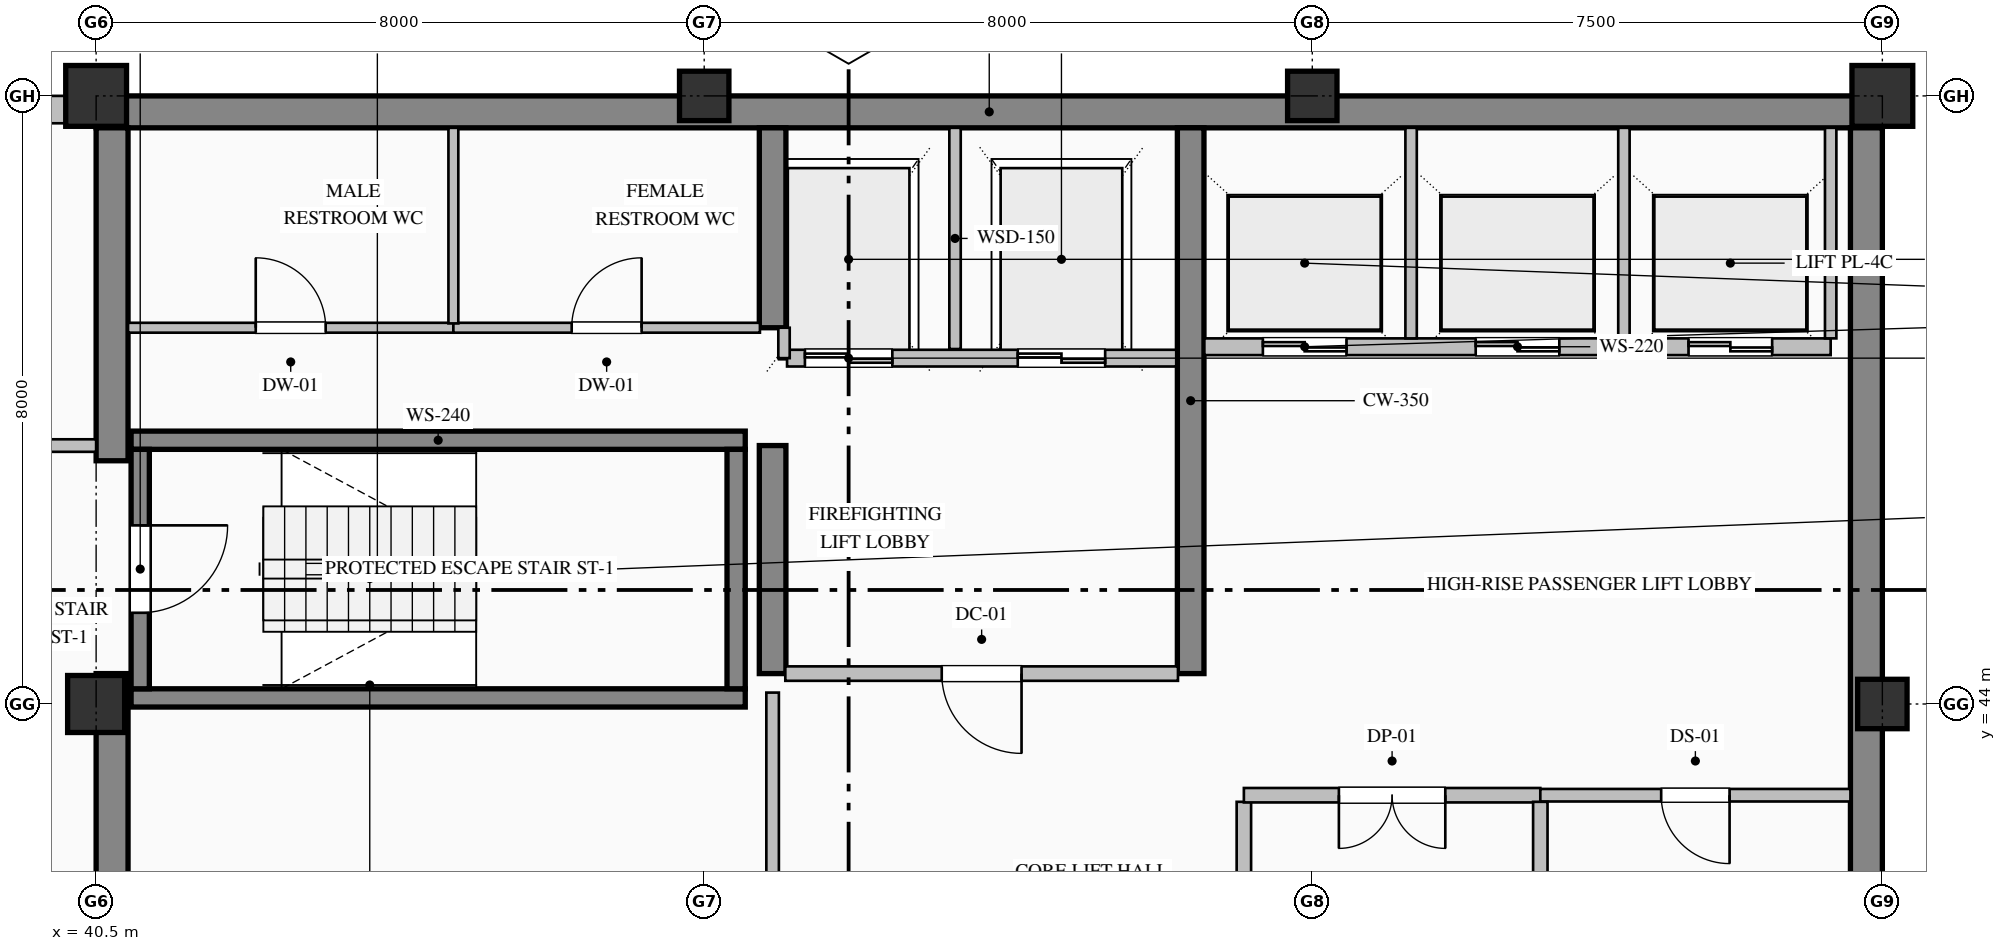
"""IFC4 building model, lengths in metres.
Left out: names, types, materials, properties, quantities, classifications, styles, units other than length and angle.
Written with IfcOpenShell. Run it as: python <this file> out.ifc"""

import sys

from ifc_helpers import new_model, si_unit, direction, frame, frame_2d, origin, origin_2d, place, context, subcontext, project, spatial, rectangle, hollow_rectangle, extrude, element, fill, save


model = new_model("IFC4")
c1 = context("Model", 3, precision=1e-05, world=origin(), true_north=direction((0.0, 1.0)))
c2 = subcontext(c1, "Body", "Model", "MODEL_VIEW")
j1 = project(units=[si_unit("LENGTHUNIT", "METRE"), si_unit("PLANEANGLEUNIT", "RADIAN")], contexts=[c1])
p1 = place(None, origin())
s1 = spatial("IfcSite", under=j1, at=p1, CompositionType="ELEMENT")
p2 = place(p1, origin())
s2 = spatial("IfcBuilding", under=s1, at=p2, CompositionType="ELEMENT")
p3 = place(p2, frame((0.0, 0.0, 315.2)))
s3 = spatial("IfcBuildingStorey", under=s2, at=p3, CompositionType="ELEMENT", Elevation=315.2)
p4 = place(p3, frame((40.5, 51.79, 0.0), z_axis=(0.0, 0.0, 1.0), x_axis=(1.0, 0.0, 0.0)))
e1 = element("IfcWall", 1, at=p4, inside=s3, PredefinedType="SHEAR", context=c2, shape_type="SweptSolid", body=[
    extrude(rectangle(XDim=23.5, YDim=0.42, at=frame_2d((11.75, 0.0))), origin(), (0.0, 0.0, 1.0), 3.785),
])
p5 = place(p3, frame((63.79, 36.32, 0.0), z_axis=(0.0, 0.0, 1.0), x_axis=(0.0, 1.0, 0.0)))
e2 = element("IfcWall", 2, at=p5, inside=s3, PredefinedType="SHEAR", context=c2, shape_type="SweptSolid", body=[
    extrude(rectangle(XDim=15.26, YDim=0.42, at=frame_2d((7.63, 0.0))), origin(), (0.0, 0.0, 1.0), 3.785),
])
p6 = place(p3, frame((40.71, 36.42, 0.0), z_axis=(0.0, 0.0, 1.0), x_axis=(0.0, 1.0, 0.0)))
e3 = element("IfcWall", 3, at=p6, inside=s3, PredefinedType="SHEAR", context=c2, shape_type="SweptSolid", body=[
    extrude(rectangle(XDim=7.98, YDim=0.42, at=frame_2d((3.99, 0.0))), origin(), (0.0, 0.0, 1.0), 3.785),
])
p7 = place(p3, frame((40.71, 47.2, 0.0), z_axis=(0.0, 0.0, 1.0), x_axis=(0.0, 1.0, 0.0)))
e4 = element("IfcWall", 4, at=p7, inside=s3, PredefinedType="SHEAR", context=c2, shape_type="SweptSolid", body=[
    extrude(rectangle(XDim=4.38, YDim=0.42, at=frame_2d((2.19, 0.0))), origin(), (0.0, 0.0, 1.0), 3.785),
])
p8 = place(p3, frame((49.4, 44.4, 0.0), z_axis=(0.0, 0.0, 1.0), x_axis=(0.0, 1.0, 0.0)))
e5 = element("IfcWall", 5, at=p8, inside=s3, PredefinedType="SHEAR", context=c2, shape_type="SweptSolid", body=[
    extrude(rectangle(XDim=3.0, YDim=0.35, at=frame_2d((1.5, 0.0))), origin(), (0.0, 0.0, 1.0), 3.785),
])
p9 = place(p3, frame((49.4, 48.95, 0.0), z_axis=(0.0, 0.0, 1.0), x_axis=(0.0, 1.0, 0.0)))
e6 = element("IfcWall", 6, at=p9, inside=s3, PredefinedType="SHEAR", context=c2, shape_type="SweptSolid", body=[
    extrude(rectangle(XDim=2.63, YDim=0.35, at=frame_2d((1.315, 0.0))), origin(), (0.0, 0.0, 1.0), 3.785),
])
p10 = place(p3, frame((54.9, 44.4, 0.0), z_axis=(0.0, 0.0, 1.0), x_axis=(0.0, 1.0, 0.0)))
e7 = element("IfcWall", 7, at=p10, inside=s3, PredefinedType="SHEAR", context=c2, shape_type="SweptSolid", body=[
    extrude(rectangle(XDim=7.18, YDim=0.35, at=frame_2d((3.59, 0.0))), origin(), (0.0, 0.0, 1.0), 3.785),
])
p11 = place(p3, frame((40.5, 44.0, 0.0), z_axis=(0.0, 0.0, 1.0), x_axis=(1.0, 0.0, 0.0)))
e8 = element("IfcColumn", 8, at=p11, inside=s3, PredefinedType="COLUMN", context=c2, shape_type="SweptSolid", body=[
    extrude(rectangle(XDim=0.75, YDim=0.75, at=origin_2d()), origin(), (0.0, 0.0, 1.0), 4.0),
])
p12 = place(p3, frame((40.5, 52.0, 0.0), z_axis=(0.0, 0.0, 1.0), x_axis=(1.0, 0.0, 0.0)))
e9 = element("IfcColumn", 9, at=p12, inside=s3, PredefinedType="COLUMN", context=c2, shape_type="SweptSolid", body=[
    extrude(hollow_rectangle(XDim=0.8, YDim=0.8, WallThickness=0.032, at=origin_2d()), origin(), (0.0, 0.0, 1.0), 4.0),
])
for number, where, z_axis, x_axis in (
    (10, (48.5, 52.0, 0.0), (0.0, 0.0, 1.0), (1.0, 0.0, 0.0)),
    (11, (56.5, 52.0, 0.0), (0.0, 0.0, 1.0), (1.0, 0.0, 0.0)),
    (12, (64.0, 44.0, 0.0), (0.0, 0.0, 1.0), (1.0, 0.0, 0.0)),
):
    element("IfcColumn", number, at=place(p3, frame(where, z_axis=z_axis, x_axis=x_axis)), inside=s3, PredefinedType="COLUMN", context=c2, shape_type="SweptSolid", body=[
        extrude(hollow_rectangle(XDim=0.65, YDim=0.65, WallThickness=0.028, at=origin_2d()), origin(), (0.0, 0.0, 1.0), 4.0),
    ])
p13 = place(p3, frame((64.0, 52.0, 0.0), z_axis=(0.0, 0.0, 1.0), x_axis=(1.0, 0.0, 0.0)))
e13 = element("IfcColumn", 13, at=p13, inside=s3, PredefinedType="COLUMN", context=c2, shape_type="SweptSolid", body=[
    extrude(hollow_rectangle(XDim=0.8, YDim=0.8, WallThickness=0.032, at=origin_2d()), origin(), (0.0, 0.0, 1.0), 4.0),
])
p14 = place(p3, frame((20.5, 51.82, 0.0), z_axis=(0.0, 0.0, 1.0), x_axis=(1.0, 0.0, 0.0)))
e14 = element("IfcWall", 14, at=p14, inside=s3, PredefinedType="SOLIDWALL", context=c2, shape_type="SweptSolid", body=[
    extrude(rectangle(XDim=20.02, YDim=0.36, at=frame_2d((10.01, 0.0))), origin(), (0.0, 0.0, 1.0), 3.335),
])
p15 = place(p14, frame((6.675, 0.0, 0.8)))
e15 = element("IfcOpeningElement", 15, at=p15, cuts=e14, PredefinedType="OPENING", context=c2, shape_type="SweptSolid", body=[
    extrude(rectangle(XDim=1.05, YDim=2.15, at=frame_2d((0.525, 1.075))), frame((0.0, 0.19, 0.0), z_axis=(0.0, -1.0, 0.0), x_axis=(1.0, 0.0, 0.0)), (0.0, 0.0, 1.0), 0.38),
])
for number, where, z_axis, x_axis in (
    (16, (40.96, 47.47, 0.0), (0.0, 0.0, 1.0), (1.0, 0.0, 0.0)),
    (17, (49.04, 44.08, 0.0), (0.0, 0.0, 1.0), (-1.0, 0.0, 0.0)),
):
    element("IfcWall", number, at=place(p3, frame(where, z_axis=z_axis, x_axis=x_axis)), inside=s3, PredefinedType="SOLIDWALL", context=c2, shape_type="SweptSolid", body=[
        extrude(rectangle(XDim=8.08, YDim=0.24, at=frame_2d((4.04, 0.0))), origin(), (0.0, 0.0, 1.0), 4.0),
    ])
p16 = place(p3, frame((41.08, 47.35, 0.0), z_axis=(0.0, 0.0, 1.0), x_axis=(0.0, -1.0, 0.0)))
e18 = element("IfcWall", 18, at=p16, inside=s3, PredefinedType="SOLIDWALL", context=c2, shape_type="SweptSolid", body=[
    extrude(rectangle(XDim=3.15, YDim=0.24, at=frame_2d((1.575, 0.0))), origin(), (0.0, 0.0, 1.0), 4.0),
])
p17 = place(p16, frame((1.0, 0.0, 0.0)))
e19 = element("IfcOpeningElement", 19, at=p17, cuts=e18, PredefinedType="OPENING", context=c2, shape_type="SweptSolid", body=[
    extrude(rectangle(XDim=1.15, YDim=2.2, at=frame_2d((0.575, 1.1))), frame((0.0, 0.13, 0.0), z_axis=(0.0, -1.0, 0.0), x_axis=(1.0, 0.0, 0.0)), (0.0, 0.0, 1.0), 0.26),
])
p18 = place(p3, frame((48.92, 44.2, 0.0), z_axis=(0.0, 0.0, 1.0), x_axis=(0.0, 1.0, 0.0)))
e20 = element("IfcWall", 20, at=p18, inside=s3, PredefinedType="SOLIDWALL", context=c2, shape_type="SweptSolid", body=[
    extrude(rectangle(XDim=3.15, YDim=0.24, at=frame_2d((1.575, 0.0))), origin(), (0.0, 0.0, 1.0), 4.0),
])
p19 = place(p3, frame((54.71, 48.55, 0.0), z_axis=(0.0, 0.0, 1.0), x_axis=(-1.0, 0.0, 0.0)))
e21 = element("IfcWall", 21, at=p19, inside=s3, PredefinedType="PARTITIONING", context=c2, shape_type="SweptSolid", body=[
    extrude(rectangle(XDim=5.12, YDim=0.22, at=frame_2d((2.56, 0.0))), origin(), (0.0, 0.0, 1.0), 3.785),
])
p20 = place(p19, frame((3.735, 0.0, 0.0)))
e22 = element("IfcOpeningElement", 22, at=p20, cuts=e21, PredefinedType="OPENING", context=c2, shape_type="SweptSolid", body=[
    extrude(rectangle(XDim=1.15, YDim=2.2, at=frame_2d((0.575, 1.1))), frame((0.0, 0.12, 0.0), z_axis=(0.0, -1.0, 0.0), x_axis=(1.0, 0.0, 0.0)), (0.0, 0.0, 1.0), 0.24),
])
p21 = place(p19, frame((0.935, 0.0, 0.0)))
e23 = element("IfcOpeningElement", 23, at=p21, cuts=e21, PredefinedType="OPENING", context=c2, shape_type="SweptSolid", body=[
    extrude(rectangle(XDim=1.15, YDim=2.2, at=frame_2d((0.575, 1.1))), frame((0.0, 0.12, 0.0), z_axis=(0.0, -1.0, 0.0), x_axis=(1.0, 0.0, 0.0)), (0.0, 0.0, 1.0), 0.24),
])
p22 = place(p3, frame((51.8, 48.67, 0.0), z_axis=(0.0, 0.0, 1.0), x_axis=(0.0, 1.0, 0.0)))
e24 = element("IfcWall", 24, at=p22, inside=s3, PredefinedType="PARTITIONING", context=c2, shape_type="SweptSolid", body=[
    extrude(rectangle(XDim=2.91, YDim=0.15, at=frame_2d((1.455, 0.0))), origin(), (0.0, 0.0, 1.0), 3.785),
])
p23 = place(p3, frame((49.55, 48.55, 0.0), z_axis=(0.0, 0.0, 1.0), x_axis=(0.0, 1.0, 0.0)))
e25 = element("IfcWall", 25, at=p23, inside=s3, PredefinedType="PARTITIONING", context=c2, shape_type="SweptSolid", body=[
    extrude(rectangle(XDim=0.4, YDim=0.15, at=frame_2d((0.2, 0.0))), origin(), (0.0, 0.0, 1.0), 3.785),
])
p24 = place(p3, frame((63.32, 48.7, 0.0), z_axis=(0.0, 0.0, 1.0), x_axis=(-1.0, 0.0, 0.0)))
e26 = element("IfcWall", 26, at=p24, inside=s3, PredefinedType="PARTITIONING", context=c2, shape_type="SweptSolid", body=[
    extrude(rectangle(XDim=8.24, YDim=0.22, at=frame_2d((4.12, 0.0))), origin(), (0.0, 0.0, 1.0), 3.785),
])
p25 = place(p24, frame((6.37, 0.0, 0.0)))
e27 = element("IfcOpeningElement", 27, at=p25, cuts=e26, PredefinedType="OPENING", context=c2, shape_type="SweptSolid", body=[
    extrude(rectangle(XDim=1.1, YDim=2.2, at=frame_2d((0.55, 1.1))), frame((0.0, 0.12, 0.0), z_axis=(0.0, -1.0, 0.0), x_axis=(1.0, 0.0, 0.0)), (0.0, 0.0, 1.0), 0.24),
])
p26 = place(p24, frame((3.57, 0.0, 0.0)))
e28 = element("IfcOpeningElement", 28, at=p26, cuts=e26, PredefinedType="OPENING", context=c2, shape_type="SweptSolid", body=[
    extrude(rectangle(XDim=1.1, YDim=2.2, at=frame_2d((0.55, 1.1))), frame((0.0, 0.12, 0.0), z_axis=(0.0, -1.0, 0.0), x_axis=(1.0, 0.0, 0.0)), (0.0, 0.0, 1.0), 0.24),
])
p27 = place(p24, frame((0.77, 0.0, 0.0)))
e29 = element("IfcOpeningElement", 29, at=p27, cuts=e26, PredefinedType="OPENING", context=c2, shape_type="SweptSolid", body=[
    extrude(rectangle(XDim=1.1, YDim=2.2, at=frame_2d((0.55, 1.1))), frame((0.0, 0.12, 0.0), z_axis=(0.0, -1.0, 0.0), x_axis=(1.0, 0.0, 0.0)), (0.0, 0.0, 1.0), 0.24),
])
for number, where, z_axis, x_axis in (
    (30, (57.8, 48.81, 0.0), (0.0, 0.0, 1.0), (0.0, 1.0, 0.0)),
    (31, (60.6, 48.81, 0.0), (0.0, 0.0, 1.0), (0.0, 1.0, 0.0)),
    (32, (63.32, 48.81, 0.0), (0.0, 0.0, 1.0), (0.0, 1.0, 0.0)),
):
    element("IfcWall", number, at=place(p3, frame(where, z_axis=z_axis, x_axis=x_axis)), inside=s3, PredefinedType="PARTITIONING", context=c2, shape_type="SweptSolid", body=[
        extrude(rectangle(XDim=2.77, YDim=0.15, at=frame_2d((1.385, 0.0))), origin(), (0.0, 0.0, 1.0), 3.785),
    ])
p28 = place(p3, frame((37.8, 47.4, 0.0), z_axis=(0.0, 0.0, 1.0), x_axis=(1.0, 0.0, 0.0)))
e33 = element("IfcWall", 33, at=p28, inside=s3, PredefinedType="PARTITIONING", context=c2, shape_type="SweptSolid", body=[
    extrude(rectangle(XDim=2.7, YDim=0.165, at=frame_2d((1.35, 0.0))), origin(), (0.0, 0.0, 1.0), 3.785),
])
p29 = place(p28, frame((0.825, 0.0, 0.0)))
e34 = element("IfcOpeningElement", 34, at=p29, cuts=e33, PredefinedType="OPENING", context=c2, shape_type="SweptSolid", body=[
    extrude(rectangle(XDim=1.05, YDim=2.15, at=frame_2d((0.525, 1.075))), frame((0.0, 0.093, 0.0), z_axis=(0.0, -1.0, 0.0), x_axis=(1.0, 0.0, 0.0)), (0.0, 0.0, 1.0), 0.185),
])
p30 = place(p3, frame((40.92, 48.95, 0.0), z_axis=(0.0, 0.0, 1.0), x_axis=(1.0, 0.0, 0.0)))
e35 = element("IfcWall", 35, at=p30, inside=s3, PredefinedType="PARTITIONING", context=c2, shape_type="SweptSolid", body=[
    extrude(rectangle(XDim=4.28, YDim=0.13, at=frame_2d((2.14, 0.0))), origin(), (0.0, 0.0, 1.0), 3.785),
])
p31 = place(p30, frame((1.68, 0.0, 0.0)))
e36 = element("IfcOpeningElement", 36, at=p31, cuts=e35, PredefinedType="OPENING", context=c2, shape_type="SweptSolid", body=[
    extrude(rectangle(XDim=0.92, YDim=2.15, at=frame_2d((0.46, 1.075))), frame((0.0, 0.075, 0.0), z_axis=(0.0, -1.0, 0.0), x_axis=(1.0, 0.0, 0.0)), (0.0, 0.0, 1.0), 0.15),
])
p32 = place(p3, frame((45.2, 48.95, 0.0), z_axis=(0.0, 0.0, 1.0), x_axis=(1.0, 0.0, 0.0)))
e37 = element("IfcWall", 37, at=p32, inside=s3, PredefinedType="PARTITIONING", context=c2, shape_type="SweptSolid", body=[
    extrude(rectangle(XDim=4.033, YDim=0.13, at=frame_2d((2.017, 0.0))), origin(), (0.0, 0.0, 1.0), 3.785),
])
p33 = place(p32, frame((1.556, 0.0, 0.0)))
e38 = element("IfcOpeningElement", 38, at=p33, cuts=e37, PredefinedType="OPENING", context=c2, shape_type="SweptSolid", body=[
    extrude(rectangle(XDim=0.92, YDim=2.15, at=frame_2d((0.46, 1.075))), frame((0.0, 0.075, 0.0), z_axis=(0.0, -1.0, 0.0), x_axis=(1.0, 0.0, 0.0)), (0.0, 0.0, 1.0), 0.15),
])
p34 = place(p3, frame((54.733, 44.4, 0.0), z_axis=(0.0, 0.0, 1.0), x_axis=(-1.0, 0.0, 0.0)))
e39 = element("IfcWall", 39, at=p34, inside=s3, PredefinedType="PARTITIONING", context=c2, shape_type="SweptSolid", body=[
    extrude(rectangle(XDim=5.166, YDim=0.19, at=frame_2d((2.583, 0.0))), origin(), (0.0, 0.0, 1.0), 3.785),
])
p35 = place(p34, frame((2.058, 0.0, 0.0)))
e40 = element("IfcOpeningElement", 40, at=p35, cuts=e39, PredefinedType="OPENING", context=c2, shape_type="SweptSolid", body=[
    extrude(rectangle(XDim=1.05, YDim=2.15, at=frame_2d((0.525, 1.075))), frame((0.0, 0.105, 0.0), z_axis=(0.0, -1.0, 0.0), x_axis=(1.0, 0.0, 0.0)), (0.0, 0.0, 1.0), 0.21),
])
p36 = place(p3, frame((49.4, 36.42, 0.0), z_axis=(0.0, 0.0, 1.0), x_axis=(0.0, 1.0, 0.0)))
e41 = element("IfcWall", 41, at=p36, inside=s3, PredefinedType="PARTITIONING", context=c2, shape_type="SweptSolid", body=[
    extrude(rectangle(XDim=7.73, YDim=0.165, at=frame_2d((3.865, 0.0))), origin(), (0.0, 0.0, 1.0), 3.027),
])
p37 = place(p36, frame((3.365, 0.0, 0.0)))
e42 = element("IfcOpeningElement", 42, at=p37, cuts=e41, PredefinedType="OPENING", context=c2, shape_type="SweptSolid", body=[
    extrude(rectangle(XDim=1.0, YDim=2.15, at=frame_2d((0.5, 1.075))), frame((0.0, 0.093, 0.0), z_axis=(0.0, -1.0, 0.0), x_axis=(1.0, 0.0, 0.0)), (0.0, 0.0, 1.0), 0.185),
])
p38 = place(p3, frame((55.6, 42.713, 0.0), z_axis=(0.0, 0.0, 1.0), x_axis=(0.0, -1.0, 0.0)))
e43 = element("IfcWall", 43, at=p38, inside=s3, PredefinedType="PARTITIONING", context=c2, shape_type="SweptSolid", body=[
    extrude(rectangle(XDim=2.731, YDim=0.19, at=frame_2d((1.365, 0.0))), origin(), (0.0, 0.0, 1.0), 3.785),
])
p39 = place(p3, frame((59.5, 42.8, 0.0), z_axis=(0.0, 0.0, 1.0), x_axis=(-1.0, 0.0, 0.0)))
e44 = element("IfcWall", 44, at=p39, inside=s3, PredefinedType="PARTITIONING", context=c2, shape_type="SweptSolid", body=[
    extrude(rectangle(XDim=3.9, YDim=0.19, at=frame_2d((1.95, 0.0))), origin(), (0.0, 0.0, 1.0), 3.785),
])
p40 = place(p39, frame((1.25, 0.0, 0.0)))
e45 = element("IfcOpeningElement", 45, at=p40, cuts=e44, PredefinedType="OPENING", context=c2, shape_type="SweptSolid", body=[
    extrude(rectangle(XDim=1.4, YDim=2.25, at=frame_2d((0.7, 1.125))), frame((0.0, 0.105, 0.0), z_axis=(0.0, -1.0, 0.0), x_axis=(1.0, 0.0, 0.0)), (0.0, 0.0, 1.0), 0.21),
])
p41 = place(p3, frame((63.58, 42.8, 0.0), z_axis=(0.0, 0.0, 1.0), x_axis=(-1.0, 0.0, 0.0)))
e46 = element("IfcWall", 46, at=p41, inside=s3, PredefinedType="PARTITIONING", context=c2, shape_type="SweptSolid", body=[
    extrude(rectangle(XDim=4.08, YDim=0.165, at=frame_2d((2.04, 0.0))), origin(), (0.0, 0.0, 1.0), 3.785),
])
p42 = place(p41, frame((1.59, 0.0, 0.0)))
e47 = element("IfcOpeningElement", 47, at=p42, cuts=e46, PredefinedType="OPENING", context=c2, shape_type="SweptSolid", body=[
    extrude(rectangle(XDim=0.9, YDim=2.15, at=frame_2d((0.45, 1.075))), frame((0.0, 0.093, 0.0), z_axis=(0.0, -1.0, 0.0), x_axis=(1.0, 0.0, 0.0)), (0.0, 0.0, 1.0), 0.185),
])
p43 = place(p3, frame((45.2, 51.58, 0.0), z_axis=(0.0, 0.0, 1.0), x_axis=(0.0, -1.0, 0.0)))
e48 = element("IfcWall", 48, at=p43, inside=s3, PredefinedType="PARTITIONING", context=c2, shape_type="SweptSolid", body=[
    extrude(rectangle(XDim=2.573, YDim=0.13, at=frame_2d((1.287, 0.0))), origin(), (0.0, 0.0, 1.0), 3.785),
])
p44 = place(p3, frame((59.5, 42.713, 0.0), z_axis=(0.0, 0.0, 1.0), x_axis=(0.0, -1.0, 0.0)))
e49 = element("IfcWall", 49, at=p44, inside=s3, PredefinedType="PARTITIONING", context=c2, shape_type="SweptSolid", body=[
    extrude(rectangle(XDim=2.731, YDim=0.19, at=frame_2d((1.365, 0.0))), origin(), (0.0, 0.0, 1.0), 3.785),
])
p45 = place(p17, origin())
e50 = element("IfcDoor", 50, at=p45, inside=s3, OperationType="SINGLE_SWING_LEFT", PredefinedType="DOOR", context=c2, shape_type="SweptSolid", body=[
    extrude(rectangle(XDim=1.15, YDim=2.2, at=frame_2d((0.575, 1.1))), frame((0.0, 0.025, 0.0), z_axis=(0.0, -1.0, 0.0), x_axis=(1.0, 0.0, 0.0)), (0.0, 0.0, 1.0), 0.05),
])
fill(e19, e50)
p46 = place(p20, origin())
e51 = element("IfcDoor", 51, at=p46, inside=s3, OperationType="DOUBLE_DOOR_SLIDING", PredefinedType="DOOR", context=c2, shape_type="SweptSolid", body=[
    extrude(rectangle(XDim=1.15, YDim=2.2, at=frame_2d((0.575, 1.1))), frame((0.0, 0.025, 0.0), z_axis=(0.0, -1.0, 0.0), x_axis=(1.0, 0.0, 0.0)), (0.0, 0.0, 1.0), 0.05),
])
fill(e22, e51)
p47 = place(p21, origin())
e52 = element("IfcDoor", 52, at=p47, inside=s3, OperationType="DOUBLE_DOOR_SLIDING", PredefinedType="DOOR", context=c2, shape_type="SweptSolid", body=[
    extrude(rectangle(XDim=1.15, YDim=2.2, at=frame_2d((0.575, 1.1))), frame((0.0, 0.025, 0.0), z_axis=(0.0, -1.0, 0.0), x_axis=(1.0, 0.0, 0.0)), (0.0, 0.0, 1.0), 0.05),
])
fill(e23, e52)
p48 = place(p25, origin())
e53 = element("IfcDoor", 53, at=p48, inside=s3, OperationType="DOUBLE_DOOR_SLIDING", PredefinedType="DOOR", context=c2, shape_type="SweptSolid", body=[
    extrude(rectangle(XDim=1.1, YDim=2.2, at=frame_2d((0.55, 1.1))), frame((0.0, 0.025, 0.0), z_axis=(0.0, -1.0, 0.0), x_axis=(1.0, 0.0, 0.0)), (0.0, 0.0, 1.0), 0.05),
])
fill(e27, e53)
p49 = place(p26, origin())
e54 = element("IfcDoor", 54, at=p49, inside=s3, OperationType="DOUBLE_DOOR_SLIDING", PredefinedType="DOOR", context=c2, shape_type="SweptSolid", body=[
    extrude(rectangle(XDim=1.1, YDim=2.2, at=frame_2d((0.55, 1.1))), frame((0.0, 0.025, 0.0), z_axis=(0.0, -1.0, 0.0), x_axis=(1.0, 0.0, 0.0)), (0.0, 0.0, 1.0), 0.05),
])
fill(e28, e54)
p50 = place(p27, origin())
e55 = element("IfcDoor", 55, at=p50, inside=s3, OperationType="DOUBLE_DOOR_SLIDING", PredefinedType="DOOR", context=c2, shape_type="SweptSolid", body=[
    extrude(rectangle(XDim=1.1, YDim=2.2, at=frame_2d((0.55, 1.1))), frame((0.0, 0.025, 0.0), z_axis=(0.0, -1.0, 0.0), x_axis=(1.0, 0.0, 0.0)), (0.0, 0.0, 1.0), 0.05),
])
fill(e29, e55)
p51 = place(p35, origin())
e56 = element("IfcDoor", 56, at=p51, inside=s3, OperationType="SINGLE_SWING_LEFT", PredefinedType="DOOR", context=c2, shape_type="SweptSolid", body=[
    extrude(rectangle(XDim=1.05, YDim=2.15, at=frame_2d((0.525, 1.075))), frame((0.0, 0.025, 0.0), z_axis=(0.0, -1.0, 0.0), x_axis=(1.0, 0.0, 0.0)), (0.0, 0.0, 1.0), 0.05),
])
fill(e40, e56)
p52 = place(p31, origin())
e57 = element("IfcDoor", 57, at=p52, inside=s3, OperationType="SINGLE_SWING_LEFT", PredefinedType="DOOR", context=c2, shape_type="SweptSolid", body=[
    extrude(rectangle(XDim=0.92, YDim=2.15, at=frame_2d((0.46, 1.075))), frame((0.0, 0.025, 0.0), z_axis=(0.0, -1.0, 0.0), x_axis=(1.0, 0.0, 0.0)), (0.0, 0.0, 1.0), 0.05),
])
fill(e36, e57)
p53 = place(p33, origin())
e58 = element("IfcDoor", 58, at=p53, inside=s3, OperationType="SINGLE_SWING_RIGHT", PredefinedType="DOOR", context=c2, shape_type="SweptSolid", body=[
    extrude(rectangle(XDim=0.92, YDim=2.15, at=frame_2d((0.46, 1.075))), frame((0.0, 0.025, 0.0), z_axis=(0.0, -1.0, 0.0), x_axis=(1.0, 0.0, 0.0)), (0.0, 0.0, 1.0), 0.05),
])
fill(e38, e58)
p54 = place(p40, origin())
e59 = element("IfcDoor", 59, at=p54, inside=s3, OperationType="DOUBLE_DOOR_SINGLE_SWING", PredefinedType="DOOR", context=c2, shape_type="SweptSolid", body=[
    extrude(rectangle(XDim=1.4, YDim=2.25, at=frame_2d((0.7, 1.125))), frame((0.0, 0.025, 0.0), z_axis=(0.0, -1.0, 0.0), x_axis=(1.0, 0.0, 0.0)), (0.0, 0.0, 1.0), 0.05),
])
fill(e45, e59)
p55 = place(p42, origin())
e60 = element("IfcDoor", 60, at=p55, inside=s3, OperationType="SINGLE_SWING_LEFT", PredefinedType="DOOR", context=c2, shape_type="SweptSolid", body=[
    extrude(rectangle(XDim=0.9, YDim=2.15, at=frame_2d((0.45, 1.075))), frame((0.0, 0.025, 0.0), z_axis=(0.0, -1.0, 0.0), x_axis=(1.0, 0.0, 0.0)), (0.0, 0.0, 1.0), 0.05),
])
fill(e47, e60)
save(model, sys.argv[1])
